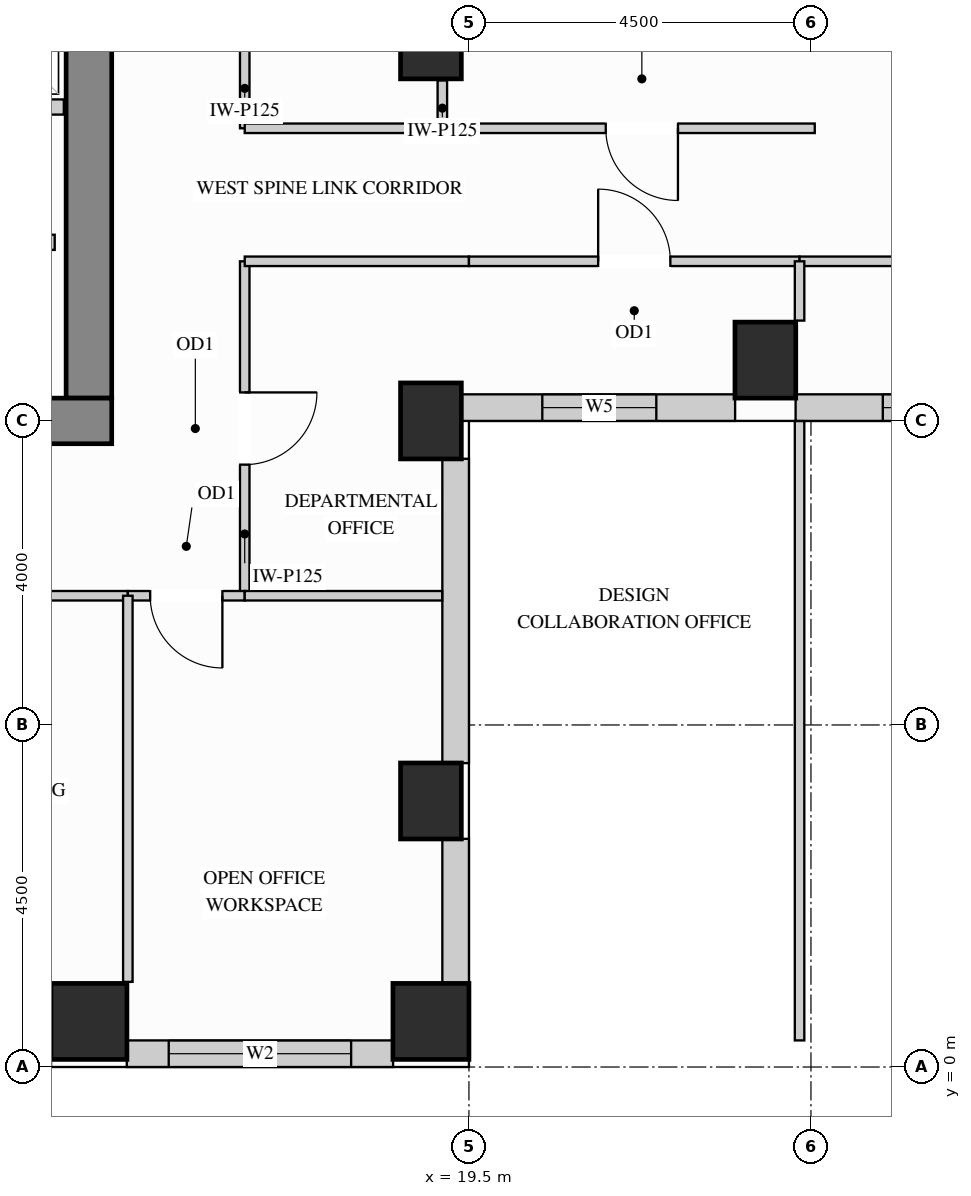
"""IFC4 building model, lengths in metres.
Left out: names, types, materials, properties, quantities, classifications, styles, units other than length and angle.
Written with IfcOpenShell. Run it as: python <this file> out.ifc"""

import sys

from ifc_helpers import new_model, si_unit, direction, frame, frame_2d, origin, origin_2d, place, context, subcontext, project, spatial, rectangle, extrude, source, transform, mapped, element, fill, save


model = new_model("IFC4")
c1 = context("Model", 3, precision=1e-05, world=origin(), true_north=direction((0.0, 1.0)))
c2 = subcontext(c1, "Body", "Model", "MODEL_VIEW")
j1 = project(units=[si_unit("LENGTHUNIT", "METRE"), si_unit("PLANEANGLEUNIT", "RADIAN")], contexts=[c1])
p1 = place(None, origin())
s1 = spatial("IfcSite", under=j1, at=p1, CompositionType="ELEMENT")
p2 = place(p1, origin())
s2 = spatial("IfcBuilding", under=s1, at=p2, CompositionType="ELEMENT")
p3 = place(p2, frame((0.0, 0.0, 189.9)))
s3 = spatial("IfcBuildingStorey", under=s2, at=p3, CompositionType="ELEMENT", Elevation=189.9)
m1 = source(origin(), c2, "Body", "SweptSolid", [
    extrude(rectangle(XDim=0.8, YDim=1.0, at=origin_2d()), origin(), (0.0, 0.0, 1.0), 3.4),
])
for number, where, z_axis, x_axis in (
    (1, (19.0, 13.5, 0.0), (0.0, 0.0, 1.0), (1.0, 0.0, 0.0)),
    (2, (19.0, 3.5, 0.0), (0.0, 0.0, 1.0), (1.0, 0.0, 0.0)),
    (3, (19.0, 8.5, 0.0), (0.0, 0.0, 1.0), (1.0, 0.0, 0.0)),
    (4, (23.4, 9.3, 0.0), (0.0, 0.0, 1.0), (1.0, 0.0, 0.0)),
):
    element("IfcColumn", number, at=place(p3, frame(where, z_axis=z_axis, x_axis=x_axis)), inside=s3, PredefinedType="COLUMN", context=c2, shape_type="MappedRepresentation", body=[
        mapped(m1, transform((0.0, 0.0, 0.0), x_axis=(1.0, 0.0, 0.0), y_axis=(0.0, 1.0, 0.0), z_axis=(0.0, 0.0, 1.0))),
    ])
m2 = source(origin(), c2, "Body", "SweptSolid", [
    extrude(rectangle(XDim=1.0, YDim=1.0, at=origin_2d()), origin(), (0.0, 0.0, 1.0), 3.4),
])
for number, where, z_axis, x_axis in (
    (5, (14.5, 0.6, 0.0), (0.0, 0.0, 1.0), (1.0, 0.0, 0.0)),
    (6, (19.0, 0.6, 0.0), (0.0, 0.0, 1.0), (1.0, 0.0, 0.0)),
):
    element("IfcColumn", number, at=place(p3, frame(where, z_axis=z_axis, x_axis=x_axis)), inside=s3, PredefinedType="COLUMN", context=c2, shape_type="MappedRepresentation", body=[
        mapped(m2, transform((0.0, 0.0, 0.0), x_axis=(1.0, 0.0, 0.0), y_axis=(0.0, 1.0, 0.0), z_axis=(0.0, 0.0, 1.0))),
    ])
m3 = source(origin(), c2, "Body", "SweptSolid", [
    extrude(rectangle(XDim=10.02, YDim=0.6, at=frame_2d((5.01, 0.0))), origin(), (0.0, 0.0, 1.0), 3.4),
])
p4 = place(p3, frame((14.5, 8.8, 0.0), z_axis=(0.0, 0.0, 1.0), x_axis=(0.0, 1.0, 0.0)))
e7 = element("IfcWall", 7, at=p4, inside=s3, PredefinedType="SHEAR", context=c2, shape_type="MappedRepresentation", body=[
    mapped(m3, transform((0.0, 0.0, 0.0), x_axis=(1.0, 0.0, 0.0), y_axis=(0.0, 1.0, 0.0), z_axis=(0.0, 0.0, 1.0))),
])
m4 = source(origin(), c2, "Body", "SweptSolid", [
    extrude(rectangle(XDim=10.6, YDim=0.6, at=frame_2d((5.3, 0.0))), origin(), (0.0, 0.0, 1.0), 3.4),
])
p5 = place(p3, frame((4.2, 8.5, 0.0), z_axis=(0.0, 0.0, 1.0), x_axis=(1.0, 0.0, 0.0)))
e8 = element("IfcWall", 8, at=p5, inside=s3, PredefinedType="SHEAR", context=c2, shape_type="MappedRepresentation", body=[
    mapped(m4, transform((0.0, 0.0, 0.0), x_axis=(1.0, 0.0, 0.0), y_axis=(0.0, 1.0, 0.0), z_axis=(0.0, 0.0, 1.0))),
])
p6 = place(p3, frame((14.998, 0.175, 0.0), z_axis=(0.0, 0.0, 1.0), x_axis=(1.0, 0.0, 0.0)))
e9 = element("IfcWall", 9, at=p6, inside=s3, PredefinedType="SOLIDWALL", context=c2, shape_type="SweptSolid", body=[
    extrude(rectangle(XDim=3.504, YDim=0.35, at=frame_2d((1.752, 0.0))), origin(), (0.0, 0.0, 1.0), 2.612),
])
p7 = place(p6, frame((0.552, 0.0, 0.78)))
e10 = element("IfcOpeningElement", 10, at=p7, cuts=e9, PredefinedType="OPENING", context=c2, shape_type="SweptSolid", body=[
    extrude(rectangle(XDim=2.4, YDim=1.652, at=frame_2d((1.2, 0.826))), frame((0.0, 0.185, 0.0), z_axis=(0.0, -1.0, 0.0), x_axis=(1.0, 0.0, 0.0)), (0.0, 0.0, 1.0), 0.37),
])
m5 = source(origin(), c2, "Body", "SweptSolid", [
    extrude(rectangle(XDim=1.904, YDim=0.35, at=frame_2d((0.952, 0.0))), origin(), (0.0, 0.0, 1.0), 2.612),
])
p8 = place(p3, frame((19.325, 1.098, 0.0), z_axis=(0.0, 0.0, 1.0), x_axis=(0.0, 1.0, 0.0)))
e11 = element("IfcWall", 11, at=p8, inside=s3, PredefinedType="SOLIDWALL", context=c2, shape_type="MappedRepresentation", body=[
    mapped(m5, transform((0.0, 0.0, 0.0), x_axis=(1.0, 0.0, 0.0), y_axis=(0.0, 1.0, 0.0), z_axis=(0.0, 0.0, 1.0))),
])
m6 = source(origin(), c2, "Body", "SweptSolid", [
    extrude(rectangle(XDim=4.004, YDim=0.35, at=frame_2d((2.002, 0.0))), origin(), (0.0, 0.0, 1.0), 2.612),
])
p9 = place(p3, frame((19.325, 3.998, 0.0), z_axis=(0.0, 0.0, 1.0), x_axis=(0.0, 1.0, 0.0)))
e12 = element("IfcWall", 12, at=p9, inside=s3, PredefinedType="SOLIDWALL", context=c2, shape_type="MappedRepresentation", body=[
    mapped(m6, transform((0.0, 0.0, 0.0), x_axis=(1.0, 0.0, 0.0), y_axis=(0.0, 1.0, 0.0), z_axis=(0.0, 0.0, 1.0))),
])
p10 = place(p3, frame((19.398, 8.675, 0.0), z_axis=(0.0, 0.0, 1.0), x_axis=(1.0, 0.0, 0.0)))
e13 = element("IfcWall", 13, at=p10, inside=s3, PredefinedType="SOLIDWALL", context=c2, shape_type="SweptSolid", body=[
    extrude(rectangle(XDim=3.604, YDim=0.35, at=frame_2d((1.802, 0.0))), origin(), (0.0, 0.0, 1.0), 3.385),
])
p11 = place(p10, frame((1.067, 0.0, 0.78)))
e14 = element("IfcOpeningElement", 14, at=p11, cuts=e13, PredefinedType="OPENING", context=c2, shape_type="SweptSolid", body=[
    extrude(rectangle(XDim=1.5, YDim=2.0, at=frame_2d((0.75, 1.0))), frame((0.0, 0.185, 0.0), z_axis=(0.0, -1.0, 0.0), x_axis=(1.0, 0.0, 0.0)), (0.0, 0.0, 1.0), 0.37),
])
p12 = place(p3, frame((23.798, 8.675, 0.0), z_axis=(0.0, 0.0, 1.0), x_axis=(1.0, 0.0, 0.0)))
e15 = element("IfcWall", 15, at=p12, inside=s3, PredefinedType="SOLIDWALL", context=c2, shape_type="SweptSolid", body=[
    extrude(rectangle(XDim=6.304, YDim=0.35, at=frame_2d((3.152, 0.0))), origin(), (0.0, 0.0, 1.0), 3.385),
])
p13 = place(p12, frame((1.147, 0.0, 0.78)))
e16 = element("IfcOpeningElement", 16, at=p13, cuts=e15, PredefinedType="OPENING", context=c2, shape_type="SweptSolid", body=[
    extrude(rectangle(XDim=1.5, YDim=2.0, at=frame_2d((0.75, 1.0))), frame((0.0, 0.185, 0.0), z_axis=(0.0, -1.0, 0.0), x_axis=(1.0, 0.0, 0.0)), (0.0, 0.0, 1.0), 0.37),
])
p14 = place(p12, frame((3.475, 0.0, 0.78)))
e17 = element("IfcOpeningElement", 17, at=p14, cuts=e15, PredefinedType="OPENING", context=c2, shape_type="SweptSolid", body=[
    extrude(rectangle(XDim=1.5, YDim=2.0, at=frame_2d((0.75, 1.0))), frame((0.0, 0.185, 0.0), z_axis=(0.0, -1.0, 0.0), x_axis=(1.0, 0.0, 0.0)), (0.0, 0.0, 1.0), 0.37),
])
m7 = source(origin(), c2, "Body", "SweptSolid", [
    extrude(rectangle(XDim=0.63, YDim=0.125, at=frame_2d((0.315, 0.0))), origin(), (0.0, 0.0, 1.0), 2.773),
])
p15 = place(p3, frame((19.15, 12.35, 0.0), z_axis=(0.0, 0.0, 1.0), x_axis=(0.0, 1.0, 0.0)))
e18 = element("IfcWall", 18, at=p15, inside=s3, PredefinedType="PARTITIONING", context=c2, shape_type="MappedRepresentation", body=[
    mapped(m7, transform((0.0, 0.0, 0.0), x_axis=(1.0, 0.0, 0.0), y_axis=(0.0, 1.0, 0.0), z_axis=(0.0, 0.0, 1.0))),
])
p16 = place(p3, frame((16.55, 12.35, 0.0), z_axis=(0.0, 0.0, 1.0), x_axis=(0.0, 1.0, 0.0)))
e19 = element("IfcWall", 19, at=p16, inside=s3, PredefinedType="PARTITIONING", context=c2, shape_type="SweptSolid", body=[
    extrude(rectangle(XDim=3.25, YDim=0.125, at=frame_2d((1.625, 0.0))), origin(), (0.0, 0.0, 1.0), 3.385),
])
p17 = place(p16, frame((1.15, 0.0, 0.0)))
e20 = element("IfcOpeningElement", 20, at=p17, cuts=e19, PredefinedType="OPENING", context=c2, shape_type="SweptSolid", body=[
    extrude(rectangle(XDim=0.95, YDim=2.15, at=frame_2d((0.475, 1.075))), frame((0.0, 0.073, 0.0), z_axis=(0.0, -1.0, 0.0), x_axis=(1.0, 0.0, 0.0)), (0.0, 0.0, 1.0), 0.145),
])
p18 = place(p3, frame((16.55, 6.2, 0.0), z_axis=(0.0, 0.0, 1.0), x_axis=(0.0, 1.0, 0.0)))
e21 = element("IfcWall", 21, at=p18, inside=s3, PredefinedType="PARTITIONING", context=c2, shape_type="SweptSolid", body=[
    extrude(rectangle(XDim=4.4, YDim=0.125, at=frame_2d((2.2, 0.0))), origin(), (0.0, 0.0, 1.0), 3.385),
])
p19 = place(p18, frame((1.725, 0.0, 0.0)))
e22 = element("IfcOpeningElement", 22, at=p19, cuts=e21, PredefinedType="OPENING", context=c2, shape_type="SweptSolid", body=[
    extrude(rectangle(XDim=0.95, YDim=2.15, at=frame_2d((0.475, 1.075))), frame((0.0, 0.073, 0.0), z_axis=(0.0, -1.0, 0.0), x_axis=(1.0, 0.0, 0.0)), (0.0, 0.0, 1.0), 0.145),
])
m8 = source(origin(), c2, "Body", "SweptSolid", [
    extrude(rectangle(XDim=2.95, YDim=0.125, at=frame_2d((1.475, 0.0))), origin(), (0.0, 0.0, 1.0), 3.385),
])
p20 = place(p3, frame((16.55, 12.35, 0.0), z_axis=(0.0, 0.0, 1.0), x_axis=(1.0, 0.0, 0.0)))
e23 = element("IfcWall", 23, at=p20, inside=s3, PredefinedType="PARTITIONING", context=c2, shape_type="MappedRepresentation", body=[
    mapped(m8, transform((0.0, 0.0, 0.0), x_axis=(1.0, 0.0, 0.0), y_axis=(0.0, 1.0, 0.0), z_axis=(0.0, 0.0, 1.0))),
])
p21 = place(p3, frame((19.5, 12.35, 0.0), z_axis=(0.0, 0.0, 1.0), x_axis=(1.0, 0.0, 0.0)))
e24 = element("IfcWall", 24, at=p21, inside=s3, PredefinedType="PARTITIONING", context=c2, shape_type="SweptSolid", body=[
    extrude(rectangle(XDim=4.55, YDim=0.125, at=frame_2d((2.275, 0.0))), origin(), (0.0, 0.0, 1.0), 3.385),
])
p22 = place(p21, frame((1.8, 0.0, 0.0)))
e25 = element("IfcOpeningElement", 25, at=p22, cuts=e24, PredefinedType="OPENING", context=c2, shape_type="SweptSolid", body=[
    extrude(rectangle(XDim=0.95, YDim=2.15, at=frame_2d((0.475, 1.075))), frame((0.0, 0.073, 0.0), z_axis=(0.0, -1.0, 0.0), x_axis=(1.0, 0.0, 0.0)), (0.0, 0.0, 1.0), 0.145),
])
p23 = place(p3, frame((16.55, 10.6, 0.0), z_axis=(0.0, 0.0, 1.0), x_axis=(1.0, 0.0, 0.0)))
e26 = element("IfcWall", 26, at=p23, inside=s3, PredefinedType="PARTITIONING", context=c2, shape_type="MappedRepresentation", body=[
    mapped(m8, transform((0.0, 0.0, 0.0), x_axis=(1.0, 0.0, 0.0), y_axis=(0.0, 1.0, 0.0), z_axis=(0.0, 0.0, 1.0))),
])
p24 = place(p3, frame((19.5, 10.6, 0.0), z_axis=(0.0, 0.0, 1.0), x_axis=(1.0, 0.0, 0.0)))
e27 = element("IfcWall", 27, at=p24, inside=s3, PredefinedType="PARTITIONING", context=c2, shape_type="SweptSolid", body=[
    extrude(rectangle(XDim=4.35, YDim=0.125, at=frame_2d((2.175, 0.0))), origin(), (0.0, 0.0, 1.0), 3.385),
])
p25 = place(p24, frame((1.7, 0.0, 0.0)))
e28 = element("IfcOpeningElement", 28, at=p25, cuts=e27, PredefinedType="OPENING", context=c2, shape_type="SweptSolid", body=[
    extrude(rectangle(XDim=0.95, YDim=2.15, at=frame_2d((0.475, 1.075))), frame((0.0, 0.073, 0.0), z_axis=(0.0, -1.0, 0.0), x_axis=(1.0, 0.0, 0.0)), (0.0, 0.0, 1.0), 0.145),
])
p26 = place(p3, frame((23.85, 10.6, 0.0), z_axis=(0.0, 0.0, 1.0), x_axis=(1.0, 0.0, 0.0)))
e29 = element("IfcWall", 29, at=p26, inside=s3, PredefinedType="PARTITIONING", context=c2, shape_type="SweptSolid", body=[
    extrude(rectangle(XDim=6.0, YDim=0.125, at=frame_2d((3.0, 0.0))), origin(), (0.0, 0.0, 1.0), 3.385),
])
p27 = place(p26, frame((2.525, 0.0, 0.0)))
e30 = element("IfcOpeningElement", 30, at=p27, cuts=e29, PredefinedType="OPENING", context=c2, shape_type="SweptSolid", body=[
    extrude(rectangle(XDim=0.95, YDim=2.15, at=frame_2d((0.475, 1.075))), frame((0.0, 0.073, 0.0), z_axis=(0.0, -1.0, 0.0), x_axis=(1.0, 0.0, 0.0)), (0.0, 0.0, 1.0), 0.145),
])
m9 = source(origin(), c2, "Body", "SweptSolid", [
    extrude(rectangle(XDim=8.148, YDim=0.125, at=frame_2d((4.074, 0.0))), origin(), (0.0, 0.0, 1.0), 3.385),
])
p28 = place(p3, frame((23.85, 0.35, 0.0), z_axis=(0.0, 0.0, 1.0), x_axis=(0.0, 1.0, 0.0)))
e31 = element("IfcWall", 31, at=p28, inside=s3, PredefinedType="PARTITIONING", context=c2, shape_type="MappedRepresentation", body=[
    mapped(m9, transform((0.0, 0.0, 0.0), x_axis=(1.0, 0.0, 0.0), y_axis=(0.0, 1.0, 0.0), z_axis=(0.0, 0.0, 1.0))),
])
m10 = source(origin(), c2, "Body", "SweptSolid", [
    extrude(rectangle(XDim=0.78, YDim=0.125, at=frame_2d((0.39, 0.0))), origin(), (0.0, 0.0, 1.0), 3.385),
])
p29 = place(p3, frame((23.85, 9.82, 0.0), z_axis=(0.0, 0.0, 1.0), x_axis=(0.0, 1.0, 0.0)))
e32 = element("IfcWall", 32, at=p29, inside=s3, PredefinedType="PARTITIONING", context=c2, shape_type="MappedRepresentation", body=[
    mapped(m10, transform((0.0, 0.0, 0.0), x_axis=(1.0, 0.0, 0.0), y_axis=(0.0, 1.0, 0.0), z_axis=(0.0, 0.0, 1.0))),
])
p30 = place(p3, frame((10.875, 6.2, 0.0), z_axis=(0.0, 0.0, 1.0), x_axis=(1.0, 0.0, 0.0)))
e33 = element("IfcWall", 33, at=p30, inside=s3, PredefinedType="PARTITIONING", context=c2, shape_type="SweptSolid", body=[
    extrude(rectangle(XDim=4.137, YDim=0.125, at=frame_2d((2.068, 0.0))), origin(), (0.0, 0.0, 1.0), 2.848),
])
p31 = place(p30, frame((1.594, 0.0, 0.0)))
e34 = element("IfcOpeningElement", 34, at=p31, cuts=e33, PredefinedType="OPENING", context=c2, shape_type="SweptSolid", body=[
    extrude(rectangle(XDim=0.95, YDim=2.15, at=frame_2d((0.475, 1.075))), frame((0.0, 0.073, 0.0), z_axis=(0.0, -1.0, 0.0), x_axis=(1.0, 0.0, 0.0)), (0.0, 0.0, 1.0), 0.145),
])
p32 = place(p3, frame((15.012, 6.2, 0.0), z_axis=(0.0, 0.0, 1.0), x_axis=(1.0, 0.0, 0.0)))
e35 = element("IfcWall", 35, at=p32, inside=s3, PredefinedType="PARTITIONING", context=c2, shape_type="SweptSolid", body=[
    extrude(rectangle(XDim=1.538, YDim=0.125, at=frame_2d((0.769, 0.0))), origin(), (0.0, 0.0, 1.0), 2.848),
])
p33 = place(p32, frame((0.294, 0.0, 0.0)))
e36 = element("IfcOpeningElement", 36, at=p33, cuts=e35, PredefinedType="OPENING", context=c2, shape_type="SweptSolid", body=[
    extrude(rectangle(XDim=0.95, YDim=2.15, at=frame_2d((0.475, 1.075))), frame((0.0, 0.073, 0.0), z_axis=(0.0, -1.0, 0.0), x_axis=(1.0, 0.0, 0.0)), (0.0, 0.0, 1.0), 0.145),
])
m11 = source(origin(), c2, "Body", "SweptSolid", [
    extrude(rectangle(XDim=2.598, YDim=0.125, at=frame_2d((1.299, 0.0))), origin(), (0.0, 0.0, 1.0), 2.848),
])
p34 = place(p3, frame((16.55, 6.2, 0.0), z_axis=(0.0, 0.0, 1.0), x_axis=(1.0, 0.0, 0.0)))
e37 = element("IfcWall", 37, at=p34, inside=s3, PredefinedType="PARTITIONING", context=c2, shape_type="MappedRepresentation", body=[
    mapped(m11, transform((0.0, 0.0, 0.0), x_axis=(1.0, 0.0, 0.0), y_axis=(0.0, 1.0, 0.0), z_axis=(0.0, 0.0, 1.0))),
])
m12 = source(origin(), c2, "Body", "SweptSolid", [
    extrude(rectangle(XDim=5.08, YDim=0.125, at=frame_2d((2.54, 0.0))), origin(), (0.0, 0.0, 1.0), 3.385),
])
p35 = place(p3, frame((15.012, 1.12, 0.0), z_axis=(0.0, 0.0, 1.0), x_axis=(0.0, 1.0, 0.0)))
e38 = element("IfcWall", 38, at=p35, inside=s3, PredefinedType="PARTITIONING", context=c2, shape_type="MappedRepresentation", body=[
    mapped(m12, transform((0.0, 0.0, 0.0), x_axis=(1.0, 0.0, 0.0), y_axis=(0.0, 1.0, 0.0), z_axis=(0.0, 0.0, 1.0))),
])
m13 = source(origin(), c2, "Body", "SweptSolid", [
    extrude(rectangle(XDim=1.63, YDim=0.2, at=frame_2d((0.815, 0.0))), origin(), (0.0, 0.0, 1.0), 3.385),
])
p36 = place(p3, frame((12.42, 10.85, 0.0), z_axis=(0.0, 0.0, 1.0), x_axis=(1.0, 0.0, 0.0)))
e39 = element("IfcWall", 39, at=p36, inside=s3, PredefinedType="PARTITIONING", context=c2, shape_type="MappedRepresentation", body=[
    mapped(m13, transform((0.0, 0.0, 0.0), x_axis=(1.0, 0.0, 0.0), y_axis=(0.0, 1.0, 0.0), z_axis=(0.0, 0.0, 1.0))),
])
m14 = source(origin(), c2, "Body", "SweptSolid", [
    extrude(rectangle(XDim=1.94, YDim=0.2, at=frame_2d((0.97, 0.0))), origin(), (0.0, 0.0, 1.0), 3.385),
])
p37 = place(p3, frame((12.23, 12.63, 0.0), z_axis=(0.0, 0.0, 1.0), x_axis=(1.0, 0.0, 0.0)))
e40 = element("IfcWall", 40, at=p37, inside=s3, PredefinedType="PARTITIONING", context=c2, shape_type="MappedRepresentation", body=[
    mapped(m14, transform((0.0, 0.0, 0.0), x_axis=(1.0, 0.0, 0.0), y_axis=(0.0, 1.0, 0.0), z_axis=(0.0, 0.0, 1.0))),
])
m15 = source(origin(), c2, "Body", "SweptSolid", [
    extrude(rectangle(XDim=0.95, YDim=2.15, at=frame_2d((0.475, 1.075))), frame((0.0, 0.025, 0.0), z_axis=(0.0, -1.0, 0.0), x_axis=(1.0, 0.0, 0.0)), (0.0, 0.0, 1.0), 0.05),
])
p38 = place(p19, origin())
e41 = element("IfcDoor", 41, at=p38, inside=s3, OperationType="SINGLE_SWING_RIGHT", PredefinedType="DOOR", context=c2, shape_type="MappedRepresentation", body=[
    mapped(m15, transform((0.0, 0.0, 0.0), x_axis=(1.0, 0.0, 0.0), y_axis=(0.0, 1.0, 0.0), z_axis=(0.0, 0.0, 1.0))),
])
fill(e22, e41)
p39 = place(p33, origin())
e42 = element("IfcDoor", 42, at=p39, inside=s3, OperationType="SINGLE_SWING_RIGHT", PredefinedType="DOOR", context=c2, shape_type="MappedRepresentation", body=[
    mapped(m15, transform((0.0, 0.0, 0.0), x_axis=(1.0, 0.0, 0.0), y_axis=(0.0, 1.0, 0.0), z_axis=(0.0, 0.0, 1.0))),
])
fill(e36, e42)
p40 = place(p22, origin())
e43 = element("IfcDoor", 43, at=p40, inside=s3, OperationType="SINGLE_SWING_RIGHT", PredefinedType="DOOR", context=c2, shape_type="MappedRepresentation", body=[
    mapped(m15, transform((0.0, 0.0, 0.0), x_axis=(1.0, 0.0, 0.0), y_axis=(0.0, 1.0, 0.0), z_axis=(0.0, 0.0, 1.0))),
])
fill(e25, e43)
p41 = place(p25, origin())
e44 = element("IfcDoor", 44, at=p41, inside=s3, OperationType="SINGLE_SWING_LEFT", PredefinedType="DOOR", context=c2, shape_type="MappedRepresentation", body=[
    mapped(m15, transform((0.0, 0.0, 0.0), x_axis=(1.0, 0.0, 0.0), y_axis=(0.0, 1.0, 0.0), z_axis=(0.0, 0.0, 1.0))),
])
fill(e28, e44)
m16 = source(origin(), c2, "Body", "SweptSolid", [
    extrude(rectangle(XDim=2.4, YDim=1.652, at=frame_2d((1.2, 0.826))), frame((0.0, 0.03, 0.0), z_axis=(0.0, -1.0, 0.0), x_axis=(1.0, 0.0, 0.0)), (0.0, 0.0, 1.0), 0.06),
])
p42 = place(p7, origin())
e45 = element("IfcWindow", 45, at=p42, inside=s3, PartitioningType="SINGLE_PANEL", PredefinedType="WINDOW", context=c2, shape_type="MappedRepresentation", body=[
    mapped(m16, transform((0.0, 0.0, 0.0), x_axis=(1.0, 0.0, 0.0), y_axis=(0.0, 1.0, 0.0), z_axis=(0.0, 0.0, 1.0))),
])
fill(e10, e45)
m17 = source(origin(), c2, "Body", "SweptSolid", [
    extrude(rectangle(XDim=1.5, YDim=2.0, at=frame_2d((0.75, 1.0))), frame((0.0, 0.03, 0.0), z_axis=(0.0, -1.0, 0.0), x_axis=(1.0, 0.0, 0.0)), (0.0, 0.0, 1.0), 0.06),
])
p43 = place(p11, origin())
e46 = element("IfcWindow", 46, at=p43, inside=s3, PartitioningType="SINGLE_PANEL", PredefinedType="WINDOW", context=c2, shape_type="MappedRepresentation", body=[
    mapped(m17, transform((0.0, 0.0, 0.0), x_axis=(1.0, 0.0, 0.0), y_axis=(0.0, 1.0, 0.0), z_axis=(0.0, 0.0, 1.0))),
])
fill(e14, e46)
p44 = place(p13, origin())
e47 = element("IfcWindow", 47, at=p44, inside=s3, PartitioningType="SINGLE_PANEL", PredefinedType="WINDOW", context=c2, shape_type="MappedRepresentation", body=[
    mapped(m17, transform((0.0, 0.0, 0.0), x_axis=(1.0, 0.0, 0.0), y_axis=(0.0, 1.0, 0.0), z_axis=(0.0, 0.0, 1.0))),
])
fill(e16, e47)
save(model, sys.argv[1])
